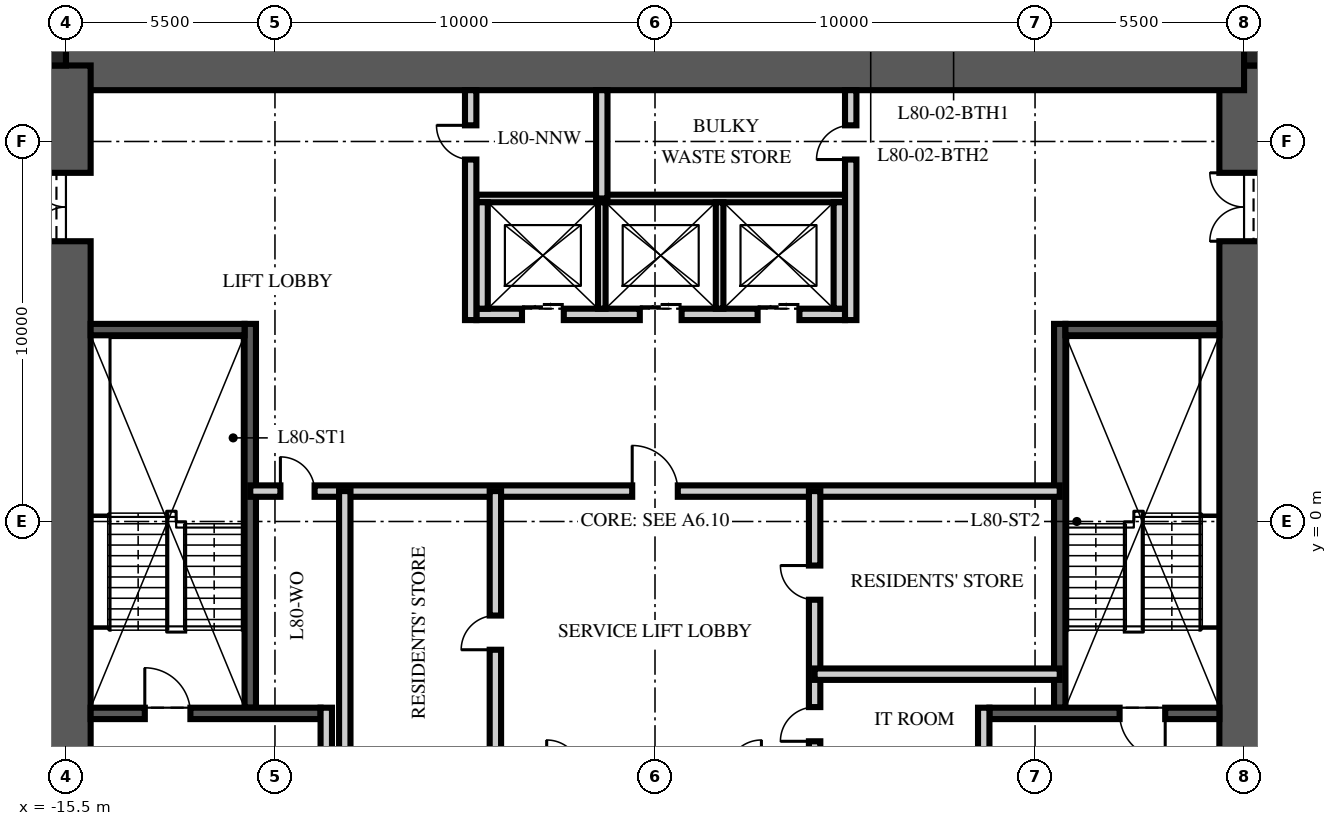
"""IFC4 building model, lengths in metres.
Left out: names, types, materials, properties, quantities, classifications, styles, units other than length and angle.
Written with IfcOpenShell. Run it as: python <this file> out.ifc"""

import sys

from ifc_helpers import new_model, si_unit, direction, frame, frame_2d, origin, origin_2d, place, context, subcontext, project, spatial, rectangle, extrude, element, fill, save


model = new_model("IFC4")
c1 = context("Model", 3, precision=1e-05, world=origin(), true_north=direction((0.0, 1.0)))
c2 = subcontext(c1, "Body", "Model", "MODEL_VIEW")
j1 = project(units=[si_unit("LENGTHUNIT", "METRE"), si_unit("PLANEANGLEUNIT", "RADIAN")], contexts=[c1])
p1 = place(None, origin())
s1 = spatial("IfcSite", under=j1, at=p1, CompositionType="ELEMENT")
p2 = place(p1, origin())
s2 = spatial("IfcBuilding", under=s1, at=p2, CompositionType="ELEMENT")
p3 = place(p2, frame((0.0, 0.0, 319.5)))
s3 = spatial("IfcBuildingStorey", under=s2, at=p3, CompositionType="ELEMENT", Elevation=319.5)
p4 = place(p3, frame((15.5, -12.0, -0.25), z_axis=(0.0, 0.0, 1.0), x_axis=(0.0, 1.0, 0.0)))
e1 = element("IfcWall", 1, at=p4, inside=s3, PredefinedType="SHEAR", context=c2, shape_type="SweptSolid", body=[
    extrude(rectangle(XDim=24.0, YDim=1.3, at=frame_2d((12.0, 0.0))), origin(), (0.0, 0.0, 1.0), 3.75),
])
p5 = place(p4, frame((3.125, 0.0, 0.25)))
e2 = element("IfcOpeningElement", 2, at=p5, cuts=e1, PredefinedType="OPENING", context=c2, shape_type="SweptSolid", body=[
    extrude(rectangle(XDim=1.2, YDim=2.1, at=frame_2d((0.6, 1.05))), frame((0.0, 0.66, 0.0), z_axis=(0.0, -1.0, 0.0), x_axis=(1.0, 0.0, 0.0)), (0.0, 0.0, 1.0), 1.32),
])
p6 = place(p4, frame((19.375, 0.0, 0.25)))
e3 = element("IfcOpeningElement", 3, at=p6, cuts=e1, PredefinedType="OPENING", context=c2, shape_type="SweptSolid", body=[
    extrude(rectangle(XDim=1.8, YDim=2.1, at=frame_2d((0.9, 1.05))), frame((0.0, 0.66, 0.0), z_axis=(0.0, -1.0, 0.0), x_axis=(1.0, 0.0, 0.0)), (0.0, 0.0, 1.0), 1.32),
])
p7 = place(p3, frame((-15.5, 12.0, -0.25), z_axis=(0.0, 0.0, 1.0), x_axis=(1.0, 0.0, 0.0)))
e4 = element("IfcWall", 4, at=p7, inside=s3, PredefinedType="SHEAR", context=c2, shape_type="SweptSolid", body=[
    extrude(rectangle(XDim=31.0, YDim=1.3, at=frame_2d((15.5, 0.0))), origin(), (0.0, 0.0, 1.0), 3.75),
])
p8 = place(p3, frame((-15.5, -12.0, -0.25), z_axis=(0.0, 0.0, 1.0), x_axis=(0.0, 1.0, 0.0)))
e5 = element("IfcWall", 5, at=p8, inside=s3, PredefinedType="SHEAR", context=c2, shape_type="SweptSolid", body=[
    extrude(rectangle(XDim=24.0, YDim=1.3, at=frame_2d((12.0, 0.0))), origin(), (0.0, 0.0, 1.0), 3.75),
])
p9 = place(p8, frame((3.125, 0.0, 0.25)))
e6 = element("IfcOpeningElement", 6, at=p9, cuts=e5, PredefinedType="OPENING", context=c2, shape_type="SweptSolid", body=[
    extrude(rectangle(XDim=1.2, YDim=2.1, at=frame_2d((0.6, 1.05))), frame((0.0, 0.66, 0.0), z_axis=(0.0, -1.0, 0.0), x_axis=(1.0, 0.0, 0.0)), (0.0, 0.0, 1.0), 1.32),
])
p10 = place(p8, frame((19.375, 0.0, 0.25)))
e7 = element("IfcOpeningElement", 7, at=p10, cuts=e5, PredefinedType="OPENING", context=c2, shape_type="SweptSolid", body=[
    extrude(rectangle(XDim=1.8, YDim=2.1, at=frame_2d((0.9, 1.05))), frame((0.0, 0.66, 0.0), z_axis=(0.0, -1.0, 0.0), x_axis=(1.0, 0.0, 0.0)), (0.0, 0.0, 1.0), 1.32),
])
for number, where, z_axis, x_axis in (
    (8, (15.825, 12.325, -0.25), (0.0, 0.0, 1.0), (1.0, 0.0, 0.0)),
    (9, (-15.825, 12.325, -0.25), (0.0, 0.0, 1.0), (1.0, 0.0, 0.0)),
):
    element("IfcColumn", number, at=place(p3, frame(where, z_axis=z_axis, x_axis=x_axis)), inside=s3, PredefinedType="COLUMN", context=c2, shape_type="SweptSolid", body=[
        extrude(rectangle(XDim=0.65, YDim=0.65, at=origin_2d()), origin(), (0.0, 0.0, 1.0), 3.75),
    ])
p11 = place(p3, frame((-10.65, -4.9, 0.0), z_axis=(0.0, 0.0, 1.0), x_axis=(0.0, 1.0, 0.0)))
e10 = element("IfcWall", 10, at=p11, inside=s3, PredefinedType="SOLIDWALL", context=c2, shape_type="SweptSolid", body=[
    extrude(rectangle(XDim=10.1, YDim=0.3, at=frame_2d((5.05, 0.0))), origin(), (0.0, 0.0, 1.0), 3.5),
])
p12 = place(p3, frame((-14.85, -5.05, 0.0), z_axis=(0.0, 0.0, 1.0), x_axis=(1.0, 0.0, 0.0)))
e11 = element("IfcWall", 11, at=p12, inside=s3, PredefinedType="SOLIDWALL", context=c2, shape_type="SweptSolid", body=[
    extrude(rectangle(XDim=6.05, YDim=0.3, at=frame_2d((3.025, 0.0))), origin(), (0.0, 0.0, 1.0), 3.5),
])
p13 = place(p12, frame((1.425, 0.0, 0.0)))
e12 = element("IfcOpeningElement", 12, at=p13, cuts=e11, PredefinedType="OPENING", context=c2, shape_type="SweptSolid", body=[
    extrude(rectangle(XDim=1.2, YDim=2.1, at=frame_2d((0.6, 1.05))), frame((0.0, 0.16, 0.0), z_axis=(0.0, -1.0, 0.0), x_axis=(1.0, 0.0, 0.0)), (0.0, 0.0, 1.0), 0.32),
])
p14 = place(p3, frame((-14.85, 5.05, 0.0), z_axis=(0.0, 0.0, 1.0), x_axis=(1.0, 0.0, 0.0)))
e13 = element("IfcWall", 13, at=p14, inside=s3, PredefinedType="SOLIDWALL", context=c2, shape_type="SweptSolid", body=[
    extrude(rectangle(XDim=4.05, YDim=0.3, at=frame_2d((2.025, 0.0))), origin(), (0.0, 0.0, 1.0), 3.5),
])
p15 = place(p3, frame((-8.65, -11.35, 0.0), z_axis=(0.0, 0.0, 1.0), x_axis=(0.0, 1.0, 0.0)))
e14 = element("IfcWall", 14, at=p15, inside=s3, PredefinedType="PARTITIONING", context=c2, shape_type="SweptSolid", body=[
    extrude(rectangle(XDim=6.45, YDim=0.3, at=frame_2d((3.225, 0.0))), origin(), (0.0, 0.0, 1.0), 3.5),
])
p16 = place(p15, frame((2.6, 0.0, 0.0)))
e15 = element("IfcOpeningElement", 15, at=p16, cuts=e14, PredefinedType="OPENING", context=c2, shape_type="SweptSolid", body=[
    extrude(rectangle(XDim=1.1, YDim=2.1, at=frame_2d((0.55, 1.05))), frame((0.0, 0.16, 0.0), z_axis=(0.0, -1.0, 0.0), x_axis=(1.0, 0.0, 0.0)), (0.0, 0.0, 1.0), 0.32),
])
p17 = place(p3, frame((10.65, -4.9, 0.0), z_axis=(0.0, 0.0, 1.0), x_axis=(0.0, 1.0, 0.0)))
e16 = element("IfcWall", 16, at=p17, inside=s3, PredefinedType="SOLIDWALL", context=c2, shape_type="SweptSolid", body=[
    extrude(rectangle(XDim=10.1, YDim=0.3, at=frame_2d((5.05, 0.0))), origin(), (0.0, 0.0, 1.0), 3.5),
])
p18 = place(p3, frame((14.85, -5.05, 0.0), z_axis=(0.0, 0.0, 1.0), x_axis=(-1.0, 0.0, 0.0)))
e17 = element("IfcWall", 17, at=p18, inside=s3, PredefinedType="SOLIDWALL", context=c2, shape_type="SweptSolid", body=[
    extrude(rectangle(XDim=6.05, YDim=0.3, at=frame_2d((3.025, 0.0))), origin(), (0.0, 0.0, 1.0), 3.5),
])
p19 = place(p18, frame((1.425, 0.0, 0.0)))
e18 = element("IfcOpeningElement", 18, at=p19, cuts=e17, PredefinedType="OPENING", context=c2, shape_type="SweptSolid", body=[
    extrude(rectangle(XDim=1.2, YDim=2.1, at=frame_2d((0.6, 1.05))), frame((0.0, 0.16, 0.0), z_axis=(0.0, -1.0, 0.0), x_axis=(1.0, 0.0, 0.0)), (0.0, 0.0, 1.0), 0.32),
])
p20 = place(p3, frame((14.85, 5.05, 0.0), z_axis=(0.0, 0.0, 1.0), x_axis=(-1.0, 0.0, 0.0)))
e19 = element("IfcWall", 19, at=p20, inside=s3, PredefinedType="SOLIDWALL", context=c2, shape_type="SweptSolid", body=[
    extrude(rectangle(XDim=4.05, YDim=0.3, at=frame_2d((2.025, 0.0))), origin(), (0.0, 0.0, 1.0), 3.5),
])
p21 = place(p3, frame((8.65, -11.35, 0.0), z_axis=(0.0, 0.0, 1.0), x_axis=(0.0, 1.0, 0.0)))
e20 = element("IfcWall", 20, at=p21, inside=s3, PredefinedType="PARTITIONING", context=c2, shape_type="SweptSolid", body=[
    extrude(rectangle(XDim=6.45, YDim=0.3, at=frame_2d((3.225, 0.0))), origin(), (0.0, 0.0, 1.0), 3.5),
])
p22 = place(p21, frame((2.6, 0.0, 0.0)))
e21 = element("IfcOpeningElement", 21, at=p22, cuts=e20, PredefinedType="OPENING", context=c2, shape_type="SweptSolid", body=[
    extrude(rectangle(XDim=1.1, YDim=2.1, at=frame_2d((0.55, 1.05))), frame((0.0, 0.16, 0.0), z_axis=(0.0, -1.0, 0.0), x_axis=(1.0, 0.0, 0.0)), (0.0, 0.0, 1.0), 0.32),
])
p23 = place(p3, frame((-4.7, 5.45, 0.0), z_axis=(0.0, 0.0, 1.0), x_axis=(1.0, 0.0, 0.0)))
e22 = element("IfcWall", 22, at=p23, inside=s3, PredefinedType="PARTITIONING", context=c2, shape_type="SweptSolid", body=[
    extrude(rectangle(XDim=9.7, YDim=0.3, at=frame_2d((4.85, 0.0))), origin(), (0.0, 0.0, 1.0), 3.5),
])
p24 = place(p23, frame((1.2, 0.0, 0.0)))
e23 = element("IfcOpeningElement", 23, at=p24, cuts=e22, PredefinedType="OPENING", context=c2, shape_type="SweptSolid", body=[
    extrude(rectangle(XDim=1.1, YDim=2.1, at=frame_2d((0.55, 1.05))), frame((0.0, 0.16, 0.0), z_axis=(0.0, -1.0, 0.0), x_axis=(1.0, 0.0, 0.0)), (0.0, 0.0, 1.0), 0.32),
])
p25 = place(p23, frame((4.3, 0.0, 0.0)))
e24 = element("IfcOpeningElement", 24, at=p25, cuts=e22, PredefinedType="OPENING", context=c2, shape_type="SweptSolid", body=[
    extrude(rectangle(XDim=1.1, YDim=2.1, at=frame_2d((0.55, 1.05))), frame((0.0, 0.16, 0.0), z_axis=(0.0, -1.0, 0.0), x_axis=(1.0, 0.0, 0.0)), (0.0, 0.0, 1.0), 0.32),
])
p26 = place(p23, frame((7.4, 0.0, 0.0)))
e25 = element("IfcOpeningElement", 25, at=p26, cuts=e22, PredefinedType="OPENING", context=c2, shape_type="SweptSolid", body=[
    extrude(rectangle(XDim=1.1, YDim=2.1, at=frame_2d((0.55, 1.05))), frame((0.0, 0.16, 0.0), z_axis=(0.0, -1.0, 0.0), x_axis=(1.0, 0.0, 0.0)), (0.0, 0.0, 1.0), 0.32),
])
p27 = place(p3, frame((-4.7, 8.5, 0.0), z_axis=(0.0, 0.0, 1.0), x_axis=(1.0, 0.0, 0.0)))
e26 = element("IfcWall", 26, at=p27, inside=s3, PredefinedType="PARTITIONING", context=c2, shape_type="SweptSolid", body=[
    extrude(rectangle(XDim=9.7, YDim=0.2, at=frame_2d((4.85, 0.0))), origin(), (0.0, 0.0, 1.0), 3.5),
])
for number, where, z_axis, x_axis in (
    (27, (-4.55, 5.6, 0.0), (0.0, 0.0, 1.0), (0.0, 1.0, 0.0)),
    (28, (4.85, 5.6, 0.0), (0.0, 0.0, 1.0), (0.0, 1.0, 0.0)),
):
    element("IfcWall", number, at=place(p3, frame(where, z_axis=z_axis, x_axis=x_axis)), inside=s3, PredefinedType="PARTITIONING", context=c2, shape_type="SweptSolid", body=[
        extrude(rectangle(XDim=2.8, YDim=0.3, at=frame_2d((1.4, 0.0))), origin(), (0.0, 0.0, 1.0), 3.5),
    ])
for number, where, z_axis, x_axis in (
    (29, (-1.4, 5.6, 0.0), (0.0, 0.0, 1.0), (0.0, 1.0, 0.0)),
    (30, (1.7, 5.6, 0.0), (0.0, 0.0, 1.0), (0.0, 1.0, 0.0)),
):
    element("IfcWall", number, at=place(p3, frame(where, z_axis=z_axis, x_axis=x_axis)), inside=s3, PredefinedType="PARTITIONING", context=c2, shape_type="SweptSolid", body=[
        extrude(rectangle(XDim=2.8, YDim=0.2, at=frame_2d((1.4, 0.0))), origin(), (0.0, 0.0, 1.0), 3.5),
    ])
p28 = place(p3, frame((-10.65, 0.8, 0.0), z_axis=(0.0, 0.0, 1.0), x_axis=(1.0, 0.0, 0.0)))
e31 = element("IfcWall", 31, at=p28, inside=s3, PredefinedType="PARTITIONING", context=c2, shape_type="SweptSolid", body=[
    extrude(rectangle(XDim=21.3, YDim=0.3, at=frame_2d((10.65, 0.0))), origin(), (0.0, 0.0, 1.0), 3.5),
])
p29 = place(p28, frame((10.05, 0.0, 0.0)))
e32 = element("IfcOpeningElement", 32, at=p29, cuts=e31, PredefinedType="OPENING", context=c2, shape_type="SweptSolid", body=[
    extrude(rectangle(XDim=1.2, YDim=2.1, at=frame_2d((0.6, 1.05))), frame((0.0, 0.16, 0.0), z_axis=(0.0, -1.0, 0.0), x_axis=(1.0, 0.0, 0.0)), (0.0, 0.0, 1.0), 0.32),
])
p30 = place(p28, frame((0.793, 0.0, 0.0)))
e33 = element("IfcOpeningElement", 33, at=p30, cuts=e31, PredefinedType="OPENING", context=c2, shape_type="SweptSolid", body=[
    extrude(rectangle(XDim=0.9, YDim=2.1, at=frame_2d((0.45, 1.05))), frame((0.0, 0.16, 0.0), z_axis=(0.0, -1.0, 0.0), x_axis=(1.0, 0.0, 0.0)), (0.0, 0.0, 1.0), 0.32),
])
p31 = place(p3, frame((-4.2, -6.65, 0.0), z_axis=(0.0, 0.0, 1.0), x_axis=(0.0, 1.0, 0.0)))
e34 = element("IfcWall", 34, at=p31, inside=s3, PredefinedType="PARTITIONING", context=c2, shape_type="SweptSolid", body=[
    extrude(rectangle(XDim=7.45, YDim=0.3, at=frame_2d((3.725, 0.0))), origin(), (0.0, 0.0, 1.0), 3.5),
])
p32 = place(p31, frame((3.275, 0.0, 0.0)))
e35 = element("IfcOpeningElement", 35, at=p32, cuts=e34, PredefinedType="OPENING", context=c2, shape_type="SweptSolid", body=[
    extrude(rectangle(XDim=0.9, YDim=2.1, at=frame_2d((0.45, 1.05))), frame((0.0, 0.16, 0.0), z_axis=(0.0, -1.0, 0.0), x_axis=(1.0, 0.0, 0.0)), (0.0, 0.0, 1.0), 0.32),
])
p33 = place(p3, frame((4.2, -6.65, 0.0), z_axis=(0.0, 0.0, 1.0), x_axis=(0.0, 1.0, 0.0)))
e36 = element("IfcWall", 36, at=p33, inside=s3, PredefinedType="PARTITIONING", context=c2, shape_type="SweptSolid", body=[
    extrude(rectangle(XDim=7.45, YDim=0.3, at=frame_2d((3.725, 0.0))), origin(), (0.0, 0.0, 1.0), 3.5),
])
p34 = place(p33, frame((0.866, 0.0, 0.0)))
e37 = element("IfcOpeningElement", 37, at=p34, cuts=e36, PredefinedType="OPENING", context=c2, shape_type="SweptSolid", body=[
    extrude(rectangle(XDim=0.9, YDim=2.1, at=frame_2d((0.45, 1.05))), frame((0.0, 0.16, 0.0), z_axis=(0.0, -1.0, 0.0), x_axis=(1.0, 0.0, 0.0)), (0.0, 0.0, 1.0), 0.32),
])
p35 = place(p33, frame((4.591, 0.0, 0.0)))
e38 = element("IfcOpeningElement", 38, at=p35, cuts=e36, PredefinedType="OPENING", context=c2, shape_type="SweptSolid", body=[
    extrude(rectangle(XDim=0.9, YDim=2.1, at=frame_2d((0.45, 1.05))), frame((0.0, 0.16, 0.0), z_axis=(0.0, -1.0, 0.0), x_axis=(1.0, 0.0, 0.0)), (0.0, 0.0, 1.0), 0.32),
])
p36 = place(p3, frame((-8.163, -6.65, 0.0), z_axis=(0.0, 0.0, 1.0), x_axis=(0.0, 1.0, 0.0)))
e39 = element("IfcWall", 39, at=p36, inside=s3, PredefinedType="PARTITIONING", context=c2, shape_type="SweptSolid", body=[
    extrude(rectangle(XDim=7.45, YDim=0.3, at=frame_2d((3.725, 0.0))), origin(), (0.0, 0.0, 1.0), 3.5),
])
p37 = place(p3, frame((10.65, -4.018, 0.0), z_axis=(0.0, 0.0, 1.0), x_axis=(-1.0, 0.0, 0.0)))
e40 = element("IfcWall", 40, at=p37, inside=s3, PredefinedType="PARTITIONING", context=c2, shape_type="SweptSolid", body=[
    extrude(rectangle(XDim=6.45, YDim=0.3, at=frame_2d((3.225, 0.0))), origin(), (0.0, 0.0, 1.0), 3.5),
])
p38 = place(p3, frame((-4.85, 5.3, 0.0), z_axis=(0.0, 0.0, 1.0), x_axis=(0.0, 1.0, 0.0)))
e41 = element("IfcWall", 41, at=p38, inside=s3, PredefinedType="PARTITIONING", context=c2, shape_type="SweptSolid", body=[
    extrude(rectangle(XDim=6.05, YDim=0.3, at=frame_2d((3.025, 0.0))), origin(), (0.0, 0.0, 1.0), 3.5),
])
p39 = place(p38, frame((4.225, 0.0, 0.0)))
e42 = element("IfcOpeningElement", 42, at=p39, cuts=e41, PredefinedType="OPENING", context=c2, shape_type="SweptSolid", body=[
    extrude(rectangle(XDim=0.9, YDim=2.1, at=frame_2d((0.45, 1.05))), frame((0.0, 0.16, 0.0), z_axis=(0.0, -1.0, 0.0), x_axis=(1.0, 0.0, 0.0)), (0.0, 0.0, 1.0), 0.32),
])
p40 = place(p3, frame((5.15, 5.3, 0.0), z_axis=(0.0, 0.0, 1.0), x_axis=(0.0, 1.0, 0.0)))
e43 = element("IfcWall", 43, at=p40, inside=s3, PredefinedType="PARTITIONING", context=c2, shape_type="SweptSolid", body=[
    extrude(rectangle(XDim=6.05, YDim=0.3, at=frame_2d((3.025, 0.0))), origin(), (0.0, 0.0, 1.0), 3.5),
])
p41 = place(p40, frame((4.225, 0.0, 0.0)))
e44 = element("IfcOpeningElement", 44, at=p41, cuts=e43, PredefinedType="OPENING", context=c2, shape_type="SweptSolid", body=[
    extrude(rectangle(XDim=0.9, YDim=2.1, at=frame_2d((0.45, 1.05))), frame((0.0, 0.16, 0.0), z_axis=(0.0, -1.0, 0.0), x_axis=(1.0, 0.0, 0.0)), (0.0, 0.0, 1.0), 0.32),
])
p42 = place(p3, frame((-1.4, 8.5, 0.0), z_axis=(0.0, 0.0, 1.0), x_axis=(0.0, 1.0, 0.0)))
e45 = element("IfcWall", 45, at=p42, inside=s3, PredefinedType="PARTITIONING", context=c2, shape_type="SweptSolid", body=[
    extrude(rectangle(XDim=2.85, YDim=0.3, at=frame_2d((1.425, 0.0))), origin(), (0.0, 0.0, 1.0), 3.5),
])
p43 = place(p13, origin())
e46 = element("IfcDoor", 46, at=p43, inside=s3, OperationType="SINGLE_SWING_LEFT", PredefinedType="DOOR", context=c2, shape_type="SweptSolid", body=[
    extrude(rectangle(XDim=1.2, YDim=2.1, at=frame_2d((0.6, 1.05))), frame((0.0, 0.025, 0.0), z_axis=(0.0, -1.0, 0.0), x_axis=(1.0, 0.0, 0.0)), (0.0, 0.0, 1.0), 0.05),
])
fill(e12, e46)
p44 = place(p10, origin())
e47 = element("IfcDoor", 47, at=p44, inside=s3, OperationType="DOUBLE_DOOR_SINGLE_SWING", PredefinedType="DOOR", context=c2, shape_type="SweptSolid", body=[
    extrude(rectangle(XDim=1.8, YDim=2.1, at=frame_2d((0.9, 1.05))), frame((0.0, 0.025, 0.0), z_axis=(0.0, -1.0, 0.0), x_axis=(1.0, 0.0, 0.0)), (0.0, 0.0, 1.0), 0.05),
])
fill(e7, e47)
p45 = place(p19, origin())
e48 = element("IfcDoor", 48, at=p45, inside=s3, OperationType="SINGLE_SWING_LEFT", PredefinedType="DOOR", context=c2, shape_type="SweptSolid", body=[
    extrude(rectangle(XDim=1.2, YDim=2.1, at=frame_2d((0.6, 1.05))), frame((0.0, 0.025, 0.0), z_axis=(0.0, -1.0, 0.0), x_axis=(1.0, 0.0, 0.0)), (0.0, 0.0, 1.0), 0.05),
])
fill(e18, e48)
p46 = place(p6, origin())
e49 = element("IfcDoor", 49, at=p46, inside=s3, OperationType="DOUBLE_DOOR_SINGLE_SWING", PredefinedType="DOOR", context=c2, shape_type="SweptSolid", body=[
    extrude(rectangle(XDim=1.8, YDim=2.1, at=frame_2d((0.9, 1.05))), frame((0.0, 0.025, 0.0), z_axis=(0.0, -1.0, 0.0), x_axis=(1.0, 0.0, 0.0)), (0.0, 0.0, 1.0), 0.05),
])
fill(e3, e49)
p47 = place(p24, origin())
e50 = element("IfcDoor", 50, at=p47, inside=s3, OperationType="DOUBLE_DOOR_SLIDING", PredefinedType="DOOR", context=c2, shape_type="SweptSolid", body=[
    extrude(rectangle(XDim=1.1, YDim=2.1, at=frame_2d((0.55, 1.05))), frame((0.0, 0.025, 0.0), z_axis=(0.0, -1.0, 0.0), x_axis=(1.0, 0.0, 0.0)), (0.0, 0.0, 1.0), 0.05),
])
fill(e23, e50)
p48 = place(p25, origin())
e51 = element("IfcDoor", 51, at=p48, inside=s3, OperationType="DOUBLE_DOOR_SLIDING", PredefinedType="DOOR", context=c2, shape_type="SweptSolid", body=[
    extrude(rectangle(XDim=1.1, YDim=2.1, at=frame_2d((0.55, 1.05))), frame((0.0, 0.025, 0.0), z_axis=(0.0, -1.0, 0.0), x_axis=(1.0, 0.0, 0.0)), (0.0, 0.0, 1.0), 0.05),
])
fill(e24, e51)
p49 = place(p26, origin())
e52 = element("IfcDoor", 52, at=p49, inside=s3, OperationType="DOUBLE_DOOR_SLIDING", PredefinedType="DOOR", context=c2, shape_type="SweptSolid", body=[
    extrude(rectangle(XDim=1.1, YDim=2.1, at=frame_2d((0.55, 1.05))), frame((0.0, 0.025, 0.0), z_axis=(0.0, -1.0, 0.0), x_axis=(1.0, 0.0, 0.0)), (0.0, 0.0, 1.0), 0.05),
])
fill(e25, e52)
p50 = place(p29, origin())
e53 = element("IfcDoor", 53, at=p50, inside=s3, OperationType="SINGLE_SWING_LEFT", PredefinedType="DOOR", context=c2, shape_type="SweptSolid", body=[
    extrude(rectangle(XDim=1.2, YDim=2.1, at=frame_2d((0.6, 1.05))), frame((0.0, 0.025, 0.0), z_axis=(0.0, -1.0, 0.0), x_axis=(1.0, 0.0, 0.0)), (0.0, 0.0, 1.0), 0.05),
])
fill(e32, e53)
p51 = place(p32, origin())
e54 = element("IfcDoor", 54, at=p51, inside=s3, OperationType="SINGLE_SWING_LEFT", PredefinedType="DOOR", context=c2, shape_type="SweptSolid", body=[
    extrude(rectangle(XDim=0.9, YDim=2.1, at=frame_2d((0.45, 1.05))), frame((0.0, 0.025, 0.0), z_axis=(0.0, -1.0, 0.0), x_axis=(1.0, 0.0, 0.0)), (0.0, 0.0, 1.0), 0.05),
])
fill(e35, e54)
p52 = place(p30, origin())
e55 = element("IfcDoor", 55, at=p52, inside=s3, OperationType="SINGLE_SWING_LEFT", PredefinedType="DOOR", context=c2, shape_type="SweptSolid", body=[
    extrude(rectangle(XDim=0.9, YDim=2.1, at=frame_2d((0.45, 1.05))), frame((0.0, 0.025, 0.0), z_axis=(0.0, -1.0, 0.0), x_axis=(1.0, 0.0, 0.0)), (0.0, 0.0, 1.0), 0.05),
])
fill(e33, e55)
p53 = place(p34, origin())
e56 = element("IfcDoor", 56, at=p53, inside=s3, OperationType="SINGLE_SWING_LEFT", PredefinedType="DOOR", context=c2, shape_type="SweptSolid", body=[
    extrude(rectangle(XDim=0.9, YDim=2.1, at=frame_2d((0.45, 1.05))), frame((0.0, 0.025, 0.0), z_axis=(0.0, -1.0, 0.0), x_axis=(1.0, 0.0, 0.0)), (0.0, 0.0, 1.0), 0.05),
])
fill(e37, e56)
p54 = place(p35, origin())
e57 = element("IfcDoor", 57, at=p54, inside=s3, OperationType="SINGLE_SWING_RIGHT", PredefinedType="DOOR", context=c2, shape_type="SweptSolid", body=[
    extrude(rectangle(XDim=0.9, YDim=2.1, at=frame_2d((0.45, 1.05))), frame((0.0, 0.025, 0.0), z_axis=(0.0, -1.0, 0.0), x_axis=(1.0, 0.0, 0.0)), (0.0, 0.0, 1.0), 0.05),
])
fill(e38, e57)
p55 = place(p39, origin())
e58 = element("IfcDoor", 58, at=p55, inside=s3, OperationType="SINGLE_SWING_RIGHT", PredefinedType="DOOR", context=c2, shape_type="SweptSolid", body=[
    extrude(rectangle(XDim=0.9, YDim=2.1, at=frame_2d((0.45, 1.05))), frame((0.0, 0.025, 0.0), z_axis=(0.0, -1.0, 0.0), x_axis=(1.0, 0.0, 0.0)), (0.0, 0.0, 1.0), 0.05),
])
fill(e42, e58)
p56 = place(p41, origin())
e59 = element("IfcDoor", 59, at=p56, inside=s3, OperationType="SINGLE_SWING_LEFT", PredefinedType="DOOR", context=c2, shape_type="SweptSolid", body=[
    extrude(rectangle(XDim=0.9, YDim=2.1, at=frame_2d((0.45, 1.05))), frame((0.0, 0.025, 0.0), z_axis=(0.0, -1.0, 0.0), x_axis=(1.0, 0.0, 0.0)), (0.0, 0.0, 1.0), 0.05),
])
fill(e44, e59)
save(model, sys.argv[1])
